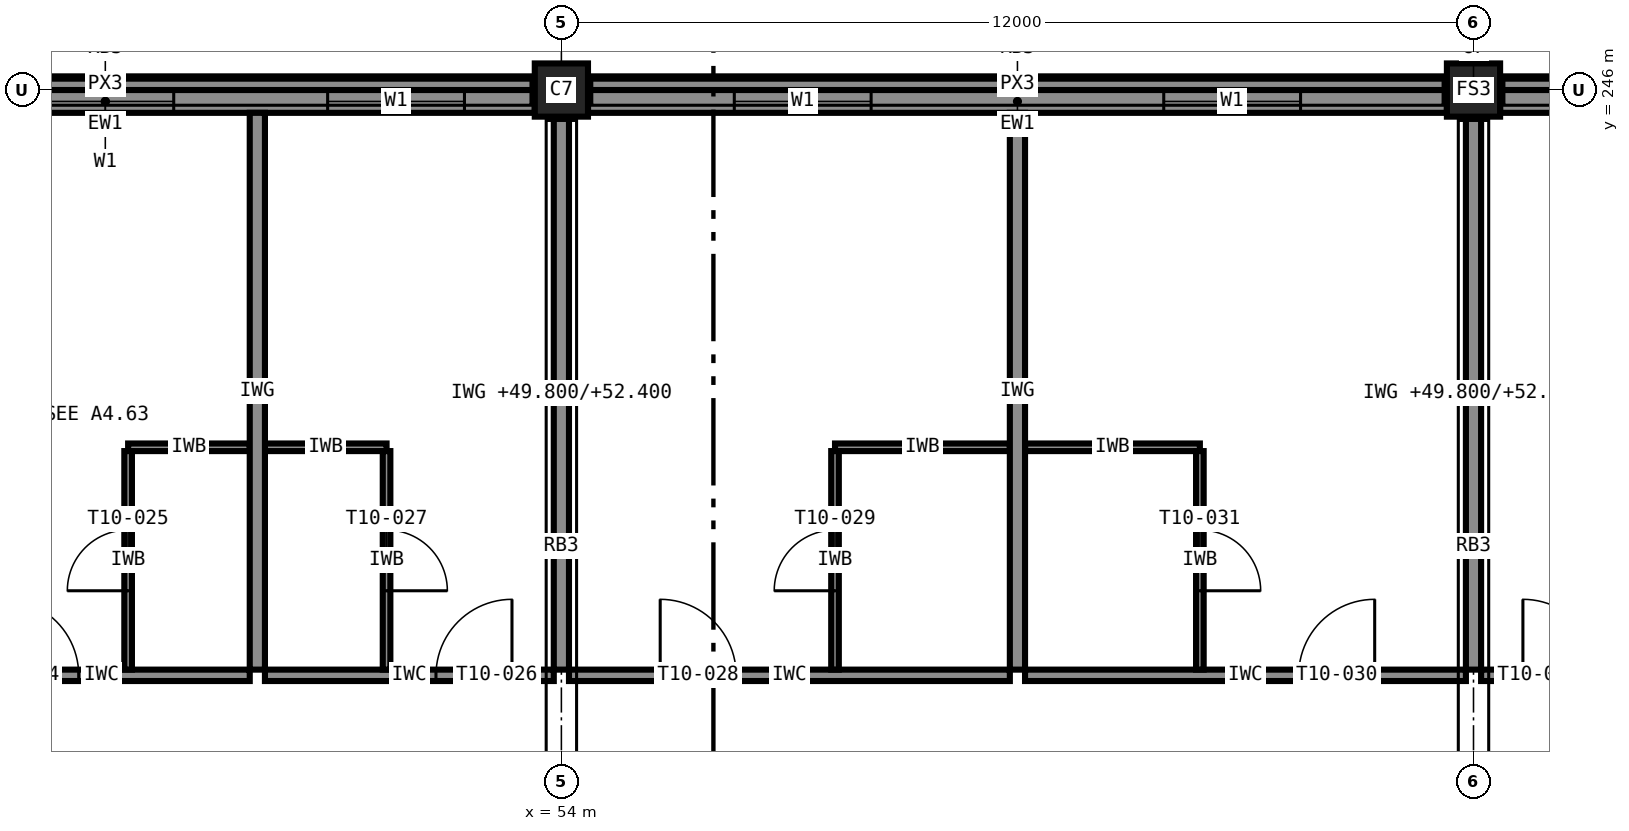
"""IFC4 building model, lengths in metres.
Left out: names, types, materials, properties, quantities, classifications, styles, units other than length and angle.
Written with IfcOpenShell. Run it as: python <this file> out.ifc"""

import sys

from ifc_helpers import new_model, si_unit, direction, frame, frame_2d, origin, origin_2d, place, context, subcontext, project, spatial, rectangle, extrude, element, fill, save


model = new_model("IFC4")
c1 = context("Model", 3, precision=1e-05, world=origin(), true_north=direction((0.0, 1.0)))
c2 = subcontext(c1, "Body", "Model", "MODEL_VIEW")
j1 = project(units=[si_unit("LENGTHUNIT", "METRE"), si_unit("PLANEANGLEUNIT", "RADIAN")], contexts=[c1])
p1 = place(None, origin())
s1 = spatial("IfcSite", under=j1, at=p1, CompositionType="ELEMENT")
p2 = place(p1, origin())
s2 = spatial("IfcBuilding", under=s1, at=p2, CompositionType="ELEMENT")
p3 = place(p2, frame((0.0, 0.0, 49.8)))
s3 = spatial("IfcBuildingStorey", under=s2, at=p3, CompositionType="ELEMENT", Elevation=49.8)
for number, where, z_axis, x_axis in (
    (1, (54.0, 246.0, 0.0), (0.0, 0.0, 1.0), (1.0, 0.0, 0.0)),
    (2, (66.0, 246.0, 0.0), (0.0, 0.0, 1.0), (1.0, 0.0, 0.0)),
):
    element("IfcColumn", number, at=place(p3, frame(where, z_axis=z_axis, x_axis=x_axis)), inside=s3, PredefinedType="COLUMN", context=c2, shape_type="SweptSolid", body=[
        extrude(rectangle(XDim=0.7, YDim=0.7, at=origin_2d()), origin(), (0.0, 0.0, 1.0), 3.6),
    ])
p4 = place(p3, frame((77.65, 245.85, 0.0), z_axis=(0.0, 0.0, 1.0), x_axis=(-1.0, 0.0, 0.0)))
e3 = element("IfcWall", 3, at=p4, inside=s3, PredefinedType="STANDARD", context=c2, shape_type="SweptSolid", body=[
    extrude(rectangle(XDim=11.3, YDim=0.3, at=frame_2d((5.65, 0.0))), origin(), (0.0, 0.0, 1.0), 2.6),
])
p5 = place(p4, frame((8.575, 0.0, 0.85)))
e4 = element("IfcOpeningElement", 4, at=p5, cuts=e3, PredefinedType="OPENING", context=c2, shape_type="SweptSolid", body=[
    extrude(rectangle(XDim=1.8, YDim=1.75, at=frame_2d((0.9, 0.875))), frame((0.0, 0.16, 0.0), z_axis=(0.0, -1.0, 0.0), x_axis=(1.0, 0.0, 0.0)), (0.0, 0.0, 1.0), 0.32),
])
p6 = place(p4, frame((4.75, 0.0, 0.85)))
e5 = element("IfcOpeningElement", 5, at=p6, cuts=e3, PredefinedType="OPENING", context=c2, shape_type="SweptSolid", body=[
    extrude(rectangle(XDim=1.8, YDim=1.75, at=frame_2d((0.9, 0.875))), frame((0.0, 0.16, 0.0), z_axis=(0.0, -1.0, 0.0), x_axis=(1.0, 0.0, 0.0)), (0.0, 0.0, 1.0), 0.32),
])
p7 = place(p4, frame((0.925, 0.0, 0.85)))
e6 = element("IfcOpeningElement", 6, at=p7, cuts=e3, PredefinedType="OPENING", context=c2, shape_type="SweptSolid", body=[
    extrude(rectangle(XDim=1.8, YDim=1.75, at=frame_2d((0.9, 0.875))), frame((0.0, 0.16, 0.0), z_axis=(0.0, -1.0, 0.0), x_axis=(1.0, 0.0, 0.0)), (0.0, 0.0, 1.0), 0.32),
])
p8 = place(p3, frame((65.65, 245.85, 0.0), z_axis=(0.0, 0.0, 1.0), x_axis=(-1.0, 0.0, 0.0)))
e7 = element("IfcWall", 7, at=p8, inside=s3, PredefinedType="STANDARD", context=c2, shape_type="SweptSolid", body=[
    extrude(rectangle(XDim=11.3, YDim=0.3, at=frame_2d((5.65, 0.0))), origin(), (0.0, 0.0, 1.0), 2.6),
])
p9 = place(p8, frame((7.575, 0.0, 0.85)))
e8 = element("IfcOpeningElement", 8, at=p9, cuts=e7, PredefinedType="OPENING", context=c2, shape_type="SweptSolid", body=[
    extrude(rectangle(XDim=1.8, YDim=1.75, at=frame_2d((0.9, 0.875))), frame((0.0, 0.16, 0.0), z_axis=(0.0, -1.0, 0.0), x_axis=(1.0, 0.0, 0.0)), (0.0, 0.0, 1.0), 0.32),
])
p10 = place(p8, frame((1.925, 0.0, 0.85)))
e9 = element("IfcOpeningElement", 9, at=p10, cuts=e7, PredefinedType="OPENING", context=c2, shape_type="SweptSolid", body=[
    extrude(rectangle(XDim=1.8, YDim=1.75, at=frame_2d((0.9, 0.875))), frame((0.0, 0.16, 0.0), z_axis=(0.0, -1.0, 0.0), x_axis=(1.0, 0.0, 0.0)), (0.0, 0.0, 1.0), 0.32),
])
p11 = place(p3, frame((53.65, 245.85, 0.0), z_axis=(0.0, 0.0, 1.0), x_axis=(-1.0, 0.0, 0.0)))
e10 = element("IfcWall", 10, at=p11, inside=s3, PredefinedType="STANDARD", context=c2, shape_type="SweptSolid", body=[
    extrude(rectangle(XDim=11.3, YDim=0.3, at=frame_2d((5.65, 0.0))), origin(), (0.0, 0.0, 1.0), 2.6),
])
p12 = place(p11, frame((4.75, 0.0, 0.85)))
e11 = element("IfcOpeningElement", 11, at=p12, cuts=e10, PredefinedType="OPENING", context=c2, shape_type="SweptSolid", body=[
    extrude(rectangle(XDim=1.8, YDim=1.75, at=frame_2d((0.9, 0.875))), frame((0.0, 0.16, 0.0), z_axis=(0.0, -1.0, 0.0), x_axis=(1.0, 0.0, 0.0)), (0.0, 0.0, 1.0), 0.32),
])
p13 = place(p11, frame((0.925, 0.0, 0.85)))
e12 = element("IfcOpeningElement", 12, at=p13, cuts=e10, PredefinedType="OPENING", context=c2, shape_type="SweptSolid", body=[
    extrude(rectangle(XDim=1.8, YDim=1.75, at=frame_2d((0.9, 0.875))), frame((0.0, 0.16, 0.0), z_axis=(0.0, -1.0, 0.0), x_axis=(1.0, 0.0, 0.0)), (0.0, 0.0, 1.0), 0.32),
])
for number, where, z_axis, x_axis in (
    (13, (77.65, 246.075, 3.4), (0.0, 0.0, 1.0), (-1.0, 0.0, 0.0)),
    (14, (65.65, 246.075, 3.4), (0.0, 0.0, 1.0), (-1.0, 0.0, 0.0)),
    (15, (53.65, 246.075, 3.4), (0.0, 0.0, 1.0), (-1.0, 0.0, 0.0)),
):
    element("IfcWall", number, at=place(p3, frame(where, z_axis=z_axis, x_axis=x_axis)), inside=s3, PredefinedType="STANDARD", context=c2, shape_type="SweptSolid", body=[
        extrude(rectangle(XDim=11.3, YDim=0.15, at=frame_2d((5.65, 0.0))), origin(), (0.0, 0.0, 1.0), 0.2),
    ])
p14 = place(p3, frame((46.0, 238.3, 0.0), z_axis=(0.0, 0.0, 1.0), x_axis=(1.0, 0.0, 0.0)))
e16 = element("IfcWall", 16, at=p14, inside=s3, PredefinedType="PARTITIONING", context=c2, shape_type="SweptSolid", body=[
    extrude(rectangle(XDim=3.9, YDim=0.15, at=frame_2d((1.95, 0.0))), origin(), (0.0, 0.0, 1.0), 3.4),
])
p15 = place(p14, frame((0.65, 0.0, 0.0)))
e17 = element("IfcOpeningElement", 17, at=p15, cuts=e16, PredefinedType="OPENING", context=c2, shape_type="SweptSolid", body=[
    extrude(rectangle(XDim=1.0, YDim=2.1, at=frame_2d((0.5, 1.05))), frame((0.0, 0.085, 0.0), z_axis=(0.0, -1.0, 0.0), x_axis=(1.0, 0.0, 0.0)), (0.0, 0.0, 1.0), 0.17),
])
p16 = place(p3, frame((48.3, 241.3, 0.0), z_axis=(0.0, 0.0, 1.0), x_axis=(1.0, 0.0, 0.0)))
e18 = element("IfcWall", 18, at=p16, inside=s3, PredefinedType="PARTITIONING", context=c2, shape_type="SweptSolid", body=[
    extrude(rectangle(XDim=1.6, YDim=0.1, at=frame_2d((0.8, 0.0))), origin(), (0.0, 0.0, 1.0), 3.4),
])
p17 = place(p3, frame((48.3, 238.375, 0.0), z_axis=(0.0, 0.0, 1.0), x_axis=(0.0, 1.0, 0.0)))
e19 = element("IfcWall", 19, at=p17, inside=s3, PredefinedType="PARTITIONING", context=c2, shape_type="SweptSolid", body=[
    extrude(rectangle(XDim=2.875, YDim=0.1, at=frame_2d((1.438, 0.0))), origin(), (0.0, 0.0, 1.0), 3.4),
])
p18 = place(p17, frame((1.038, 0.0, 0.0)))
e20 = element("IfcOpeningElement", 20, at=p18, cuts=e19, PredefinedType="OPENING", context=c2, shape_type="SweptSolid", body=[
    extrude(rectangle(XDim=0.8, YDim=2.1, at=frame_2d((0.4, 1.05))), frame((0.0, 0.06, 0.0), z_axis=(0.0, -1.0, 0.0), x_axis=(1.0, 0.0, 0.0)), (0.0, 0.0, 1.0), 0.12),
])
p19 = place(p3, frame((50.1, 238.3, 0.0), z_axis=(0.0, 0.0, 1.0), x_axis=(1.0, 0.0, 0.0)))
e21 = element("IfcWall", 21, at=p19, inside=s3, PredefinedType="PARTITIONING", context=c2, shape_type="SweptSolid", body=[
    extrude(rectangle(XDim=3.8, YDim=0.15, at=frame_2d((1.9, 0.0))), origin(), (0.0, 0.0, 1.0), 3.4),
])
p20 = place(p19, frame((2.25, 0.0, 0.0)))
e22 = element("IfcOpeningElement", 22, at=p20, cuts=e21, PredefinedType="OPENING", context=c2, shape_type="SweptSolid", body=[
    extrude(rectangle(XDim=1.0, YDim=2.1, at=frame_2d((0.5, 1.05))), frame((0.0, 0.085, 0.0), z_axis=(0.0, -1.0, 0.0), x_axis=(1.0, 0.0, 0.0)), (0.0, 0.0, 1.0), 0.17),
])
p21 = place(p3, frame((50.1, 241.3, 0.0), z_axis=(0.0, 0.0, 1.0), x_axis=(1.0, 0.0, 0.0)))
e23 = element("IfcWall", 23, at=p21, inside=s3, PredefinedType="PARTITIONING", context=c2, shape_type="SweptSolid", body=[
    extrude(rectangle(XDim=1.6, YDim=0.1, at=frame_2d((0.8, 0.0))), origin(), (0.0, 0.0, 1.0), 3.4),
])
p22 = place(p3, frame((51.7, 241.25, 0.0), z_axis=(0.0, 0.0, 1.0), x_axis=(0.0, -1.0, 0.0)))
e24 = element("IfcWall", 24, at=p22, inside=s3, PredefinedType="PARTITIONING", context=c2, shape_type="SweptSolid", body=[
    extrude(rectangle(XDim=2.875, YDim=0.1, at=frame_2d((1.438, 0.0))), origin(), (0.0, 0.0, 1.0), 3.4),
])
p23 = place(p22, frame((1.038, 0.0, 0.0)))
e25 = element("IfcOpeningElement", 25, at=p23, cuts=e24, PredefinedType="OPENING", context=c2, shape_type="SweptSolid", body=[
    extrude(rectangle(XDim=0.8, YDim=2.1, at=frame_2d((0.4, 1.05))), frame((0.0, 0.06, 0.0), z_axis=(0.0, -1.0, 0.0), x_axis=(1.0, 0.0, 0.0)), (0.0, 0.0, 1.0), 0.12),
])
p24 = place(p3, frame((54.1, 238.3, 0.0), z_axis=(0.0, 0.0, 1.0), x_axis=(1.0, 0.0, 0.0)))
e26 = element("IfcWall", 26, at=p24, inside=s3, PredefinedType="PARTITIONING", context=c2, shape_type="SweptSolid", body=[
    extrude(rectangle(XDim=5.8, YDim=0.15, at=frame_2d((2.9, 0.0))), origin(), (0.0, 0.0, 1.0), 3.4),
])
p25 = place(p24, frame((1.2, 0.0, 0.0)))
e27 = element("IfcOpeningElement", 27, at=p25, cuts=e26, PredefinedType="OPENING", context=c2, shape_type="SweptSolid", body=[
    extrude(rectangle(XDim=1.0, YDim=2.1, at=frame_2d((0.5, 1.05))), frame((0.0, 0.085, 0.0), z_axis=(0.0, -1.0, 0.0), x_axis=(1.0, 0.0, 0.0)), (0.0, 0.0, 1.0), 0.17),
])
p26 = place(p3, frame((57.6, 241.3, 0.0), z_axis=(0.0, 0.0, 1.0), x_axis=(1.0, 0.0, 0.0)))
e28 = element("IfcWall", 28, at=p26, inside=s3, PredefinedType="PARTITIONING", context=c2, shape_type="SweptSolid", body=[
    extrude(rectangle(XDim=2.3, YDim=0.1, at=frame_2d((1.15, 0.0))), origin(), (0.0, 0.0, 1.0), 3.4),
])
p27 = place(p3, frame((57.6, 238.375, 0.0), z_axis=(0.0, 0.0, 1.0), x_axis=(0.0, 1.0, 0.0)))
e29 = element("IfcWall", 29, at=p27, inside=s3, PredefinedType="PARTITIONING", context=c2, shape_type="SweptSolid", body=[
    extrude(rectangle(XDim=2.875, YDim=0.1, at=frame_2d((1.438, 0.0))), origin(), (0.0, 0.0, 1.0), 3.4),
])
p28 = place(p27, frame((1.038, 0.0, 0.0)))
e30 = element("IfcOpeningElement", 30, at=p28, cuts=e29, PredefinedType="OPENING", context=c2, shape_type="SweptSolid", body=[
    extrude(rectangle(XDim=0.8, YDim=2.1, at=frame_2d((0.4, 1.05))), frame((0.0, 0.06, 0.0), z_axis=(0.0, -1.0, 0.0), x_axis=(1.0, 0.0, 0.0)), (0.0, 0.0, 1.0), 0.12),
])
p29 = place(p3, frame((60.1, 238.3, 0.0), z_axis=(0.0, 0.0, 1.0), x_axis=(1.0, 0.0, 0.0)))
e31 = element("IfcWall", 31, at=p29, inside=s3, PredefinedType="PARTITIONING", context=c2, shape_type="SweptSolid", body=[
    extrude(rectangle(XDim=5.8, YDim=0.15, at=frame_2d((2.9, 0.0))), origin(), (0.0, 0.0, 1.0), 3.4),
])
p30 = place(p29, frame((3.6, 0.0, 0.0)))
e32 = element("IfcOpeningElement", 32, at=p30, cuts=e31, PredefinedType="OPENING", context=c2, shape_type="SweptSolid", body=[
    extrude(rectangle(XDim=1.0, YDim=2.1, at=frame_2d((0.5, 1.05))), frame((0.0, 0.085, 0.0), z_axis=(0.0, -1.0, 0.0), x_axis=(1.0, 0.0, 0.0)), (0.0, 0.0, 1.0), 0.17),
])
p31 = place(p3, frame((60.1, 241.3, 0.0), z_axis=(0.0, 0.0, 1.0), x_axis=(1.0, 0.0, 0.0)))
e33 = element("IfcWall", 33, at=p31, inside=s3, PredefinedType="PARTITIONING", context=c2, shape_type="SweptSolid", body=[
    extrude(rectangle(XDim=2.3, YDim=0.1, at=frame_2d((1.15, 0.0))), origin(), (0.0, 0.0, 1.0), 3.4),
])
p32 = place(p3, frame((62.4, 241.25, 0.0), z_axis=(0.0, 0.0, 1.0), x_axis=(0.0, -1.0, 0.0)))
e34 = element("IfcWall", 34, at=p32, inside=s3, PredefinedType="PARTITIONING", context=c2, shape_type="SweptSolid", body=[
    extrude(rectangle(XDim=2.875, YDim=0.1, at=frame_2d((1.438, 0.0))), origin(), (0.0, 0.0, 1.0), 3.4),
])
p33 = place(p32, frame((1.038, 0.0, 0.0)))
e35 = element("IfcOpeningElement", 35, at=p33, cuts=e34, PredefinedType="OPENING", context=c2, shape_type="SweptSolid", body=[
    extrude(rectangle(XDim=0.8, YDim=2.1, at=frame_2d((0.4, 1.05))), frame((0.0, 0.06, 0.0), z_axis=(0.0, -1.0, 0.0), x_axis=(1.0, 0.0, 0.0)), (0.0, 0.0, 1.0), 0.12),
])
p34 = place(p3, frame((66.1, 238.3, 0.0), z_axis=(0.0, 0.0, 1.0), x_axis=(1.0, 0.0, 0.0)))
e36 = element("IfcWall", 36, at=p34, inside=s3, PredefinedType="PARTITIONING", context=c2, shape_type="SweptSolid", body=[
    extrude(rectangle(XDim=3.8, YDim=0.15, at=frame_2d((1.9, 0.0))), origin(), (0.0, 0.0, 1.0), 3.4),
])
p35 = place(p34, frame((0.55, 0.0, 0.0)))
e37 = element("IfcOpeningElement", 37, at=p35, cuts=e36, PredefinedType="OPENING", context=c2, shape_type="SweptSolid", body=[
    extrude(rectangle(XDim=1.0, YDim=2.1, at=frame_2d((0.5, 1.05))), frame((0.0, 0.085, 0.0), z_axis=(0.0, -1.0, 0.0), x_axis=(1.0, 0.0, 0.0)), (0.0, 0.0, 1.0), 0.17),
])
p36 = place(p3, frame((50.0, 245.7, 0.0), z_axis=(0.0, 0.0, 1.0), x_axis=(0.0, -1.0, 0.0)))
e38 = element("IfcWall", 38, at=p36, inside=s3, PredefinedType="PARTITIONING", context=c2, shape_type="SweptSolid", body=[
    extrude(rectangle(XDim=7.325, YDim=0.2, at=frame_2d((3.663, 0.0))), origin(), (0.0, 0.0, 1.0), 3.4),
])
p37 = place(p3, frame((54.0, 245.65, 0.0), z_axis=(0.0, 0.0, 1.0), x_axis=(0.0, -1.0, 0.0)))
e39 = element("IfcWall", 39, at=p37, inside=s3, PredefinedType="PARTITIONING", context=c2, shape_type="SweptSolid", body=[
    extrude(rectangle(XDim=7.275, YDim=0.2, at=frame_2d((3.637, 0.0))), origin(), (0.0, 0.0, 1.0), 2.6),
])
p38 = place(p3, frame((60.0, 245.7, 0.0), z_axis=(0.0, 0.0, 1.0), x_axis=(0.0, -1.0, 0.0)))
e40 = element("IfcWall", 40, at=p38, inside=s3, PredefinedType="PARTITIONING", context=c2, shape_type="SweptSolid", body=[
    extrude(rectangle(XDim=7.325, YDim=0.2, at=frame_2d((3.663, 0.0))), origin(), (0.0, 0.0, 1.0), 3.4),
])
p39 = place(p3, frame((66.0, 245.65, 0.0), z_axis=(0.0, 0.0, 1.0), x_axis=(0.0, -1.0, 0.0)))
e41 = element("IfcWall", 41, at=p39, inside=s3, PredefinedType="PARTITIONING", context=c2, shape_type="SweptSolid", body=[
    extrude(rectangle(XDim=7.275, YDim=0.2, at=frame_2d((3.637, 0.0))), origin(), (0.0, 0.0, 1.0), 2.6),
])
p40 = place(p9, origin())
e42 = element("IfcWindow", 42, at=p40, inside=s3, PartitioningType="SINGLE_PANEL", PredefinedType="WINDOW", context=c2, shape_type="SweptSolid", body=[
    extrude(rectangle(XDim=1.8, YDim=1.75, at=frame_2d((0.9, 0.875))), frame((0.0, 0.03, 0.0), z_axis=(0.0, -1.0, 0.0), x_axis=(1.0, 0.0, 0.0)), (0.0, 0.0, 1.0), 0.06),
])
fill(e8, e42)
p41 = place(p10, origin())
e43 = element("IfcWindow", 43, at=p41, inside=s3, PartitioningType="SINGLE_PANEL", PredefinedType="WINDOW", context=c2, shape_type="SweptSolid", body=[
    extrude(rectangle(XDim=1.8, YDim=1.75, at=frame_2d((0.9, 0.875))), frame((0.0, 0.03, 0.0), z_axis=(0.0, -1.0, 0.0), x_axis=(1.0, 0.0, 0.0)), (0.0, 0.0, 1.0), 0.06),
])
fill(e9, e43)
p42 = place(p12, origin())
e44 = element("IfcWindow", 44, at=p42, inside=s3, PartitioningType="SINGLE_PANEL", PredefinedType="WINDOW", context=c2, shape_type="SweptSolid", body=[
    extrude(rectangle(XDim=1.8, YDim=1.75, at=frame_2d((0.9, 0.875))), frame((0.0, 0.03, 0.0), z_axis=(0.0, -1.0, 0.0), x_axis=(1.0, 0.0, 0.0)), (0.0, 0.0, 1.0), 0.06),
])
fill(e11, e44)
p43 = place(p13, origin())
e45 = element("IfcWindow", 45, at=p43, inside=s3, PartitioningType="SINGLE_PANEL", PredefinedType="WINDOW", context=c2, shape_type="SweptSolid", body=[
    extrude(rectangle(XDim=1.8, YDim=1.75, at=frame_2d((0.9, 0.875))), frame((0.0, 0.03, 0.0), z_axis=(0.0, -1.0, 0.0), x_axis=(1.0, 0.0, 0.0)), (0.0, 0.0, 1.0), 0.06),
])
fill(e12, e45)
p44 = place(p15, origin())
e46 = element("IfcDoor", 46, at=p44, inside=s3, OperationType="SINGLE_SWING_LEFT", PredefinedType="DOOR", context=c2, shape_type="SweptSolid", body=[
    extrude(rectangle(XDim=1.0, YDim=2.1, at=frame_2d((0.5, 1.05))), frame((0.0, 0.025, 0.0), z_axis=(0.0, -1.0, 0.0), x_axis=(1.0, 0.0, 0.0)), (0.0, 0.0, 1.0), 0.05),
])
fill(e17, e46)
p45 = place(p18, origin())
e47 = element("IfcDoor", 47, at=p45, inside=s3, OperationType="SINGLE_SWING_LEFT", PredefinedType="DOOR", context=c2, shape_type="SweptSolid", body=[
    extrude(rectangle(XDim=0.8, YDim=2.1, at=frame_2d((0.4, 1.05))), frame((0.0, 0.025, 0.0), z_axis=(0.0, -1.0, 0.0), x_axis=(1.0, 0.0, 0.0)), (0.0, 0.0, 1.0), 0.05),
])
fill(e20, e47)
p46 = place(p20, origin())
e48 = element("IfcDoor", 48, at=p46, inside=s3, OperationType="SINGLE_SWING_RIGHT", PredefinedType="DOOR", context=c2, shape_type="SweptSolid", body=[
    extrude(rectangle(XDim=1.0, YDim=2.1, at=frame_2d((0.5, 1.05))), frame((0.0, 0.025, 0.0), z_axis=(0.0, -1.0, 0.0), x_axis=(1.0, 0.0, 0.0)), (0.0, 0.0, 1.0), 0.05),
])
fill(e22, e48)
p47 = place(p23, origin())
e49 = element("IfcDoor", 49, at=p47, inside=s3, OperationType="SINGLE_SWING_RIGHT", PredefinedType="DOOR", context=c2, shape_type="SweptSolid", body=[
    extrude(rectangle(XDim=0.8, YDim=2.1, at=frame_2d((0.4, 1.05))), frame((0.0, 0.025, 0.0), z_axis=(0.0, -1.0, 0.0), x_axis=(1.0, 0.0, 0.0)), (0.0, 0.0, 1.0), 0.05),
])
fill(e25, e49)
p48 = place(p25, origin())
e50 = element("IfcDoor", 50, at=p48, inside=s3, OperationType="SINGLE_SWING_LEFT", PredefinedType="DOOR", context=c2, shape_type="SweptSolid", body=[
    extrude(rectangle(XDim=1.0, YDim=2.1, at=frame_2d((0.5, 1.05))), frame((0.0, 0.025, 0.0), z_axis=(0.0, -1.0, 0.0), x_axis=(1.0, 0.0, 0.0)), (0.0, 0.0, 1.0), 0.05),
])
fill(e27, e50)
p49 = place(p28, origin())
e51 = element("IfcDoor", 51, at=p49, inside=s3, OperationType="SINGLE_SWING_LEFT", PredefinedType="DOOR", context=c2, shape_type="SweptSolid", body=[
    extrude(rectangle(XDim=0.8, YDim=2.1, at=frame_2d((0.4, 1.05))), frame((0.0, 0.025, 0.0), z_axis=(0.0, -1.0, 0.0), x_axis=(1.0, 0.0, 0.0)), (0.0, 0.0, 1.0), 0.05),
])
fill(e30, e51)
p50 = place(p30, origin())
e52 = element("IfcDoor", 52, at=p50, inside=s3, OperationType="SINGLE_SWING_RIGHT", PredefinedType="DOOR", context=c2, shape_type="SweptSolid", body=[
    extrude(rectangle(XDim=1.0, YDim=2.1, at=frame_2d((0.5, 1.05))), frame((0.0, 0.025, 0.0), z_axis=(0.0, -1.0, 0.0), x_axis=(1.0, 0.0, 0.0)), (0.0, 0.0, 1.0), 0.05),
])
fill(e32, e52)
p51 = place(p33, origin())
e53 = element("IfcDoor", 53, at=p51, inside=s3, OperationType="SINGLE_SWING_RIGHT", PredefinedType="DOOR", context=c2, shape_type="SweptSolid", body=[
    extrude(rectangle(XDim=0.8, YDim=2.1, at=frame_2d((0.4, 1.05))), frame((0.0, 0.025, 0.0), z_axis=(0.0, -1.0, 0.0), x_axis=(1.0, 0.0, 0.0)), (0.0, 0.0, 1.0), 0.05),
])
fill(e35, e53)
p52 = place(p35, origin())
e54 = element("IfcDoor", 54, at=p52, inside=s3, OperationType="SINGLE_SWING_LEFT", PredefinedType="DOOR", context=c2, shape_type="SweptSolid", body=[
    extrude(rectangle(XDim=1.0, YDim=2.1, at=frame_2d((0.5, 1.05))), frame((0.0, 0.025, 0.0), z_axis=(0.0, -1.0, 0.0), x_axis=(1.0, 0.0, 0.0)), (0.0, 0.0, 1.0), 0.05),
])
fill(e37, e54)
save(model, sys.argv[1])
